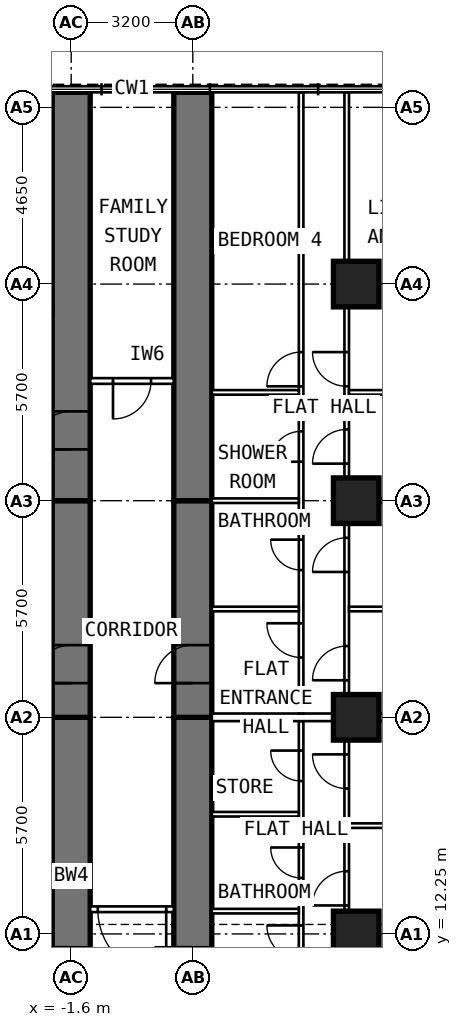
"""IFC4 building model, lengths in metres.
Left out: names, types, materials, properties, quantities, classifications, styles, units other than length and angle.
Written with IfcOpenShell. Run it as: python <this file> out.ifc"""

import sys

from ifc_helpers import new_model, si_unit, direction, frame, frame_2d, origin, origin_2d, place, context, subcontext, project, spatial, rectangle, extrude, element, fill, save


model = new_model("IFC4")
c1 = context("Model", 3, precision=1e-05, world=origin(), true_north=direction((0.0, 1.0)))
c2 = subcontext(c1, "Body", "Model", "MODEL_VIEW")
j1 = project(units=[si_unit("LENGTHUNIT", "METRE"), si_unit("PLANEANGLEUNIT", "RADIAN")], contexts=[c1])
p1 = place(None, origin())
s1 = spatial("IfcSite", under=j1, at=p1, CompositionType="ELEMENT")
p2 = place(p1, origin())
s2 = spatial("IfcBuilding", under=s1, at=p2, CompositionType="ELEMENT")
p3 = place(p2, frame((0.0, 0.0, 75.4)))
s3 = spatial("IfcBuildingStorey", under=s2, at=p3, CompositionType="ELEMENT", Elevation=75.4)
for number, where, z_axis, x_axis in (
    (1, (5.9, 12.25, 0.0), (0.0, 0.0, 1.0), (0.0, 1.0, 0.0)),
    (2, (5.9, 17.95, 0.0), (0.0, 0.0, 1.0), (0.0, 1.0, 0.0)),
    (3, (5.9, 23.65, 0.0), (0.0, 0.0, 1.0), (0.0, 1.0, 0.0)),
    (4, (5.9, 29.35, 0.0), (0.0, 0.0, 1.0), (0.0, 1.0, 0.0)),
):
    element("IfcColumn", number, at=place(p3, frame(where, z_axis=z_axis, x_axis=x_axis)), inside=s3, PredefinedType="COLUMN", context=c2, shape_type="SweptSolid", body=[
        extrude(rectangle(XDim=1.2, YDim=1.2, at=origin_2d()), origin(), (0.0, 0.0, 1.0), 5.4),
    ])
p4 = place(p3, frame((-1.6, 9.6, 0.0), z_axis=(0.0, 0.0, 1.0), x_axis=(0.0, 1.0, 0.0)))
e5 = element("IfcWall", 5, at=p4, inside=s3, PredefinedType="SHEAR", context=c2, shape_type="SweptSolid", body=[
    extrude(rectangle(XDim=8.35, YDim=1.0, at=frame_2d((4.175, 0.0))), origin(), (0.0, 0.0, 1.0), 5.4),
])
p5 = place(p4, frame((1.3, 0.0, 0.0)))
e6 = element("IfcOpeningElement", 6, at=p5, cuts=e5, PredefinedType="OPENING", context=c2, shape_type="SweptSolid", body=[
    extrude(rectangle(XDim=1.0, YDim=2.1, at=frame_2d((0.5, 1.05))), frame((0.0, 0.512, 0.0), z_axis=(0.0, -1.0, 0.0), x_axis=(1.0, 0.0, 0.0)), (0.0, 0.0, 1.0), 1.024),
])
p6 = place(p3, frame((-1.6, 17.95, 0.0), z_axis=(0.0, 0.0, 1.0), x_axis=(0.0, 1.0, 0.0)))
e7 = element("IfcWall", 7, at=p6, inside=s3, PredefinedType="SHEAR", context=c2, shape_type="SweptSolid", body=[
    extrude(rectangle(XDim=5.7, YDim=1.0, at=frame_2d((2.85, 0.0))), origin(), (0.0, 0.0, 1.0), 5.4),
])
p7 = place(p6, frame((0.9, 0.0, 0.0)))
e8 = element("IfcOpeningElement", 8, at=p7, cuts=e7, PredefinedType="OPENING", context=c2, shape_type="SweptSolid", body=[
    extrude(rectangle(XDim=1.0, YDim=2.1, at=frame_2d((0.5, 1.05))), frame((0.0, 0.512, 0.0), z_axis=(0.0, -1.0, 0.0), x_axis=(1.0, 0.0, 0.0)), (0.0, 0.0, 1.0), 1.024),
])
p8 = place(p3, frame((-1.6, 23.65, 0.0), z_axis=(0.0, 0.0, 1.0), x_axis=(0.0, 1.0, 0.0)))
e9 = element("IfcWall", 9, at=p8, inside=s3, PredefinedType="SHEAR", context=c2, shape_type="SweptSolid", body=[
    extrude(rectangle(XDim=10.745, YDim=1.0, at=frame_2d((5.373, 0.0))), origin(), (0.0, 0.0, 1.0), 5.4),
])
p9 = place(p8, frame((1.35, 0.0, 0.0)))
e10 = element("IfcOpeningElement", 10, at=p9, cuts=e9, PredefinedType="OPENING", context=c2, shape_type="SweptSolid", body=[
    extrude(rectangle(XDim=1.0, YDim=2.1, at=frame_2d((0.5, 1.05))), frame((0.0, 0.512, 0.0), z_axis=(0.0, -1.0, 0.0), x_axis=(1.0, 0.0, 0.0)), (0.0, 0.0, 1.0), 1.024),
])
p10 = place(p3, frame((1.6, 9.6, 0.0), z_axis=(0.0, 0.0, 1.0), x_axis=(0.0, 1.0, 0.0)))
e11 = element("IfcWall", 11, at=p10, inside=s3, PredefinedType="SHEAR", context=c2, shape_type="SweptSolid", body=[
    extrude(rectangle(XDim=8.35, YDim=1.0, at=frame_2d((4.175, 0.0))), origin(), (0.0, 0.0, 1.0), 5.4),
])
p11 = place(p10, frame((1.3, 0.0, 0.0)))
e12 = element("IfcOpeningElement", 12, at=p11, cuts=e11, PredefinedType="OPENING", context=c2, shape_type="SweptSolid", body=[
    extrude(rectangle(XDim=1.0, YDim=2.1, at=frame_2d((0.5, 1.05))), frame((0.0, 0.512, 0.0), z_axis=(0.0, -1.0, 0.0), x_axis=(1.0, 0.0, 0.0)), (0.0, 0.0, 1.0), 1.024),
])
p12 = place(p3, frame((1.6, 17.95, 0.0), z_axis=(0.0, 0.0, 1.0), x_axis=(0.0, 1.0, 0.0)))
e13 = element("IfcWall", 13, at=p12, inside=s3, PredefinedType="SHEAR", context=c2, shape_type="SweptSolid", body=[
    extrude(rectangle(XDim=5.7, YDim=1.0, at=frame_2d((2.85, 0.0))), origin(), (0.0, 0.0, 1.0), 5.4),
])
p13 = place(p12, frame((0.9, 0.0, 0.0)))
e14 = element("IfcOpeningElement", 14, at=p13, cuts=e13, PredefinedType="OPENING", context=c2, shape_type="SweptSolid", body=[
    extrude(rectangle(XDim=1.0, YDim=2.1, at=frame_2d((0.5, 1.05))), frame((0.0, 0.512, 0.0), z_axis=(0.0, -1.0, 0.0), x_axis=(1.0, 0.0, 0.0)), (0.0, 0.0, 1.0), 1.024),
])
p14 = place(p3, frame((1.6, 23.65, 0.0), z_axis=(0.0, 0.0, 1.0), x_axis=(0.0, 1.0, 0.0)))
e15 = element("IfcWall", 15, at=p14, inside=s3, PredefinedType="SHEAR", context=c2, shape_type="SweptSolid", body=[
    extrude(rectangle(XDim=10.745, YDim=1.0, at=frame_2d((5.373, 0.0))), origin(), (0.0, 0.0, 1.0), 5.4),
])
p15 = place(p3, frame((4.45, 10.1, 0.0), z_axis=(0.0, 0.0, 1.0), x_axis=(0.0, 1.0, 0.0)))
e16 = element("IfcWall", 16, at=p15, inside=s3, PredefinedType="PARTITIONING", context=c2, shape_type="SweptSolid", body=[
    extrude(rectangle(XDim=7.75, YDim=0.12, at=frame_2d((3.875, 0.0))), origin(), (0.0, 0.0, 1.0), 5.15),
])
p16 = place(p15, frame((1.475, 0.0, 0.0)))
e17 = element("IfcOpeningElement", 17, at=p16, cuts=e16, PredefinedType="OPENING", context=c2, shape_type="SweptSolid", body=[
    extrude(rectangle(XDim=0.9, YDim=2.1, at=frame_2d((0.45, 1.05))), frame((0.0, 0.072, 0.0), z_axis=(0.0, -1.0, 0.0), x_axis=(1.0, 0.0, 0.0)), (0.0, 0.0, 1.0), 0.144),
])
p17 = place(p15, frame((3.625, 0.0, 0.0)))
e18 = element("IfcOpeningElement", 18, at=p17, cuts=e16, PredefinedType="OPENING", context=c2, shape_type="SweptSolid", body=[
    extrude(rectangle(XDim=0.8, YDim=2.1, at=frame_2d((0.4, 1.05))), frame((0.0, 0.072, 0.0), z_axis=(0.0, -1.0, 0.0), x_axis=(1.0, 0.0, 0.0)), (0.0, 0.0, 1.0), 0.144),
])
p18 = place(p15, frame((6.175, 0.0, 0.0)))
e19 = element("IfcOpeningElement", 19, at=p18, cuts=e16, PredefinedType="OPENING", context=c2, shape_type="SweptSolid", body=[
    extrude(rectangle(XDim=0.8, YDim=2.1, at=frame_2d((0.4, 1.05))), frame((0.0, 0.072, 0.0), z_axis=(0.0, -1.0, 0.0), x_axis=(1.0, 0.0, 0.0)), (0.0, 0.0, 1.0), 0.144),
])
p19 = place(p3, frame((5.65, 9.6, 0.0), z_axis=(0.0, 0.0, 1.0), x_axis=(0.0, 1.0, 0.0)))
e20 = element("IfcWall", 20, at=p19, inside=s3, PredefinedType="PARTITIONING", context=c2, shape_type="SweptSolid", body=[
    extrude(rectangle(XDim=8.1, YDim=0.12, at=frame_2d((4.05, 0.0))), origin(), (0.0, 0.0, 1.0), 5.15),
])
p20 = place(p19, frame((3.4, 0.0, 0.0)))
e21 = element("IfcOpeningElement", 21, at=p20, cuts=e20, PredefinedType="OPENING", context=c2, shape_type="SweptSolid", body=[
    extrude(rectangle(XDim=0.9, YDim=2.1, at=frame_2d((0.45, 1.05))), frame((0.0, 0.072, 0.0), z_axis=(0.0, -1.0, 0.0), x_axis=(1.0, 0.0, 0.0)), (0.0, 0.0, 1.0), 0.144),
])
p21 = place(p19, frame((6.475, 0.0, 0.0)))
e22 = element("IfcOpeningElement", 22, at=p21, cuts=e20, PredefinedType="OPENING", context=c2, shape_type="SweptSolid", body=[
    extrude(rectangle(XDim=0.9, YDim=2.1, at=frame_2d((0.45, 1.05))), frame((0.0, 0.072, 0.0), z_axis=(0.0, -1.0, 0.0), x_axis=(1.0, 0.0, 0.0)), (0.0, 0.0, 1.0), 0.144),
])
p22 = place(p3, frame((5.71, 15.1, 0.0), z_axis=(0.0, 0.0, 1.0), x_axis=(1.0, 0.0, 0.0)))
e23 = element("IfcWall", 23, at=p22, inside=s3, PredefinedType="PARTITIONING", context=c2, shape_type="SweptSolid", body=[
    extrude(rectangle(XDim=5.035, YDim=0.12, at=frame_2d((2.518, 0.0))), origin(), (0.0, 0.0, 1.0), 5.15),
])
for number, where, z_axis, x_axis in (
    (24, (2.1, 12.85, 0.0), (0.0, 0.0, 1.0), (1.0, 0.0, 0.0)),
    (25, (2.1, 15.4, 0.0), (0.0, 0.0, 1.0), (1.0, 0.0, 0.0)),
):
    element("IfcWall", number, at=place(p3, frame(where, z_axis=z_axis, x_axis=x_axis)), inside=s3, PredefinedType="PARTITIONING", context=c2, shape_type="SweptSolid", body=[
        extrude(rectangle(XDim=2.29, YDim=0.12, at=frame_2d((1.145, 0.0))), origin(), (0.0, 0.0, 1.0), 5.15),
    ])
p23 = place(p3, frame((4.45, 18.05, 0.0), z_axis=(0.0, 0.0, 1.0), x_axis=(0.0, 1.0, 0.0)))
e26 = element("IfcWall", 26, at=p23, inside=s3, PredefinedType="PARTITIONING", context=c2, shape_type="SweptSolid", body=[
    extrude(rectangle(XDim=16.345, YDim=0.12, at=frame_2d((8.172, 0.0))), origin(), (0.0, 0.0, 1.0), 5.15),
])
p24 = place(p23, frame((1.475, 0.0, 0.0)))
e27 = element("IfcOpeningElement", 27, at=p24, cuts=e26, PredefinedType="OPENING", context=c2, shape_type="SweptSolid", body=[
    extrude(rectangle(XDim=0.9, YDim=2.1, at=frame_2d((0.45, 1.05))), frame((0.0, 0.072, 0.0), z_axis=(0.0, -1.0, 0.0), x_axis=(1.0, 0.0, 0.0)), (0.0, 0.0, 1.0), 0.144),
])
p25 = place(p23, frame((3.775, 0.0, 0.0)))
e28 = element("IfcOpeningElement", 28, at=p25, cuts=e26, PredefinedType="OPENING", context=c2, shape_type="SweptSolid", body=[
    extrude(rectangle(XDim=0.8, YDim=2.1, at=frame_2d((0.4, 1.05))), frame((0.0, 0.072, 0.0), z_axis=(0.0, -1.0, 0.0), x_axis=(1.0, 0.0, 0.0)), (0.0, 0.0, 1.0), 0.144),
])
p26 = place(p23, frame((6.625, 0.0, 0.0)))
e29 = element("IfcOpeningElement", 29, at=p26, cuts=e26, PredefinedType="OPENING", context=c2, shape_type="SweptSolid", body=[
    extrude(rectangle(XDim=0.8, YDim=2.1, at=frame_2d((0.4, 1.05))), frame((0.0, 0.072, 0.0), z_axis=(0.0, -1.0, 0.0), x_axis=(1.0, 0.0, 0.0)), (0.0, 0.0, 1.0), 0.144),
])
p27 = place(p23, frame((8.61, 0.0, 0.0)))
e30 = element("IfcOpeningElement", 30, at=p27, cuts=e26, PredefinedType="OPENING", context=c2, shape_type="SweptSolid", body=[
    extrude(rectangle(XDim=0.9, YDim=2.1, at=frame_2d((0.45, 1.05))), frame((0.0, 0.072, 0.0), z_axis=(0.0, -1.0, 0.0), x_axis=(1.0, 0.0, 0.0)), (0.0, 0.0, 1.0), 0.144),
])
p28 = place(p3, frame((5.65, 18.05, 0.0), z_axis=(0.0, 0.0, 1.0), x_axis=(0.0, 1.0, 0.0)))
e31 = element("IfcWall", 31, at=p28, inside=s3, PredefinedType="PARTITIONING", context=c2, shape_type="SweptSolid", body=[
    extrude(rectangle(XDim=16.345, YDim=0.12, at=frame_2d((8.172, 0.0))), origin(), (0.0, 0.0, 1.0), 5.15),
])
p29 = place(p28, frame((0.875, 0.0, 0.0)))
e32 = element("IfcOpeningElement", 32, at=p29, cuts=e31, PredefinedType="OPENING", context=c2, shape_type="SweptSolid", body=[
    extrude(rectangle(XDim=0.9, YDim=2.1, at=frame_2d((0.45, 1.05))), frame((0.0, 0.072, 0.0), z_axis=(0.0, -1.0, 0.0), x_axis=(1.0, 0.0, 0.0)), (0.0, 0.0, 1.0), 0.144),
])
p30 = place(p28, frame((3.725, 0.0, 0.0)))
e33 = element("IfcOpeningElement", 33, at=p30, cuts=e31, PredefinedType="OPENING", context=c2, shape_type="SweptSolid", body=[
    extrude(rectangle(XDim=0.9, YDim=2.1, at=frame_2d((0.45, 1.05))), frame((0.0, 0.072, 0.0), z_axis=(0.0, -1.0, 0.0), x_axis=(1.0, 0.0, 0.0)), (0.0, 0.0, 1.0), 0.144),
])
p31 = place(p28, frame((6.575, 0.0, 0.0)))
e34 = element("IfcOpeningElement", 34, at=p31, cuts=e31, PredefinedType="OPENING", context=c2, shape_type="SweptSolid", body=[
    extrude(rectangle(XDim=0.9, YDim=2.1, at=frame_2d((0.45, 1.05))), frame((0.0, 0.072, 0.0), z_axis=(0.0, -1.0, 0.0), x_axis=(1.0, 0.0, 0.0)), (0.0, 0.0, 1.0), 0.144),
])
p32 = place(p28, frame((8.61, 0.0, 0.0)))
e35 = element("IfcOpeningElement", 35, at=p32, cuts=e31, PredefinedType="OPENING", context=c2, shape_type="SweptSolid", body=[
    extrude(rectangle(XDim=0.9, YDim=2.1, at=frame_2d((0.45, 1.05))), frame((0.0, 0.072, 0.0), z_axis=(0.0, -1.0, 0.0), x_axis=(1.0, 0.0, 0.0)), (0.0, 0.0, 1.0), 0.144),
])
p33 = place(p3, frame((5.71, 20.8, 0.0), z_axis=(0.0, 0.0, 1.0), x_axis=(1.0, 0.0, 0.0)))
e36 = element("IfcWall", 36, at=p33, inside=s3, PredefinedType="PARTITIONING", context=c2, shape_type="SweptSolid", body=[
    extrude(rectangle(XDim=5.035, YDim=0.12, at=frame_2d((2.518, 0.0))), origin(), (0.0, 0.0, 1.0), 5.15),
])
p34 = place(p3, frame((5.71, 23.65, 0.0), z_axis=(0.0, 0.0, 1.0), x_axis=(1.0, 0.0, 0.0)))
e37 = element("IfcWall", 37, at=p34, inside=s3, PredefinedType="PARTITIONING", context=c2, shape_type="SweptSolid", body=[
    extrude(rectangle(XDim=5.035, YDim=0.12, at=frame_2d((2.518, 0.0))), origin(), (0.0, 0.0, 1.0), 4.25),
])
p35 = place(p3, frame((5.71, 26.5, 0.0), z_axis=(0.0, 0.0, 1.0), x_axis=(1.0, 0.0, 0.0)))
e38 = element("IfcWall", 38, at=p35, inside=s3, PredefinedType="PARTITIONING", context=c2, shape_type="SweptSolid", body=[
    extrude(rectangle(XDim=5.035, YDim=0.12, at=frame_2d((2.518, 0.0))), origin(), (0.0, 0.0, 1.0), 5.15),
])
p36 = place(p3, frame((2.1, 20.8, 0.0), z_axis=(0.0, 0.0, 1.0), x_axis=(1.0, 0.0, 0.0)))
e39 = element("IfcWall", 39, at=p36, inside=s3, PredefinedType="PARTITIONING", context=c2, shape_type="SweptSolid", body=[
    extrude(rectangle(XDim=2.29, YDim=0.12, at=frame_2d((1.145, 0.0))), origin(), (0.0, 0.0, 1.0), 5.15),
])
p37 = place(p3, frame((2.1, 23.65, 0.0), z_axis=(0.0, 0.0, 1.0), x_axis=(1.0, 0.0, 0.0)))
e40 = element("IfcWall", 40, at=p37, inside=s3, PredefinedType="PARTITIONING", context=c2, shape_type="SweptSolid", body=[
    extrude(rectangle(XDim=2.29, YDim=0.12, at=frame_2d((1.145, 0.0))), origin(), (0.0, 0.0, 1.0), 4.25),
])
p38 = place(p3, frame((2.1, 26.5, 0.0), z_axis=(0.0, 0.0, 1.0), x_axis=(1.0, 0.0, 0.0)))
e41 = element("IfcWall", 41, at=p38, inside=s3, PredefinedType="PARTITIONING", context=c2, shape_type="SweptSolid", body=[
    extrude(rectangle(XDim=2.29, YDim=0.12, at=frame_2d((1.145, 0.0))), origin(), (0.0, 0.0, 1.0), 5.15),
])
p39 = place(p3, frame((2.1, 17.95, 0.0), z_axis=(0.0, 0.0, 1.0), x_axis=(1.0, 0.0, 0.0)))
e42 = element("IfcWall", 42, at=p39, inside=s3, PredefinedType="PARTITIONING", context=c2, shape_type="SweptSolid", body=[
    extrude(rectangle(XDim=8.645, YDim=0.2, at=frame_2d((4.323, 0.0))), origin(), (0.0, 0.0, 1.0), 4.25),
])
p40 = place(p3, frame((1.1, 26.8, 0.0), z_axis=(0.0, 0.0, 1.0), x_axis=(-1.0, 0.0, 0.0)))
e43 = element("IfcWall", 43, at=p40, inside=s3, PredefinedType="PARTITIONING", context=c2, shape_type="SweptSolid", body=[
    extrude(rectangle(XDim=2.2, YDim=0.15, at=frame_2d((1.1, 0.0))), origin(), (0.0, 0.0, 1.0), 5.15),
])
p41 = place(p40, frame((0.6, 0.0, 0.0)))
e44 = element("IfcOpeningElement", 44, at=p41, cuts=e43, PredefinedType="OPENING", context=c2, shape_type="SweptSolid", body=[
    extrude(rectangle(XDim=1.0, YDim=2.1, at=frame_2d((0.5, 1.05))), frame((0.0, 0.087, 0.0), z_axis=(0.0, -1.0, 0.0), x_axis=(1.0, 0.0, 0.0)), (0.0, 0.0, 1.0), 0.174),
])
p42 = place(p3, frame((1.1, 12.9, 0.0), z_axis=(0.0, 0.0, 1.0), x_axis=(-1.0, 0.0, 0.0)))
e45 = element("IfcWall", 45, at=p42, inside=s3, PredefinedType="PARTITIONING", context=c2, shape_type="SweptSolid", body=[
    extrude(rectangle(XDim=2.2, YDim=0.15, at=frame_2d((1.1, 0.0))), origin(), (0.0, 0.0, 1.0), 5.15),
])
p43 = place(p42, frame((0.2, 0.0, 0.0)))
e46 = element("IfcOpeningElement", 46, at=p43, cuts=e45, PredefinedType="OPENING", context=c2, shape_type="SweptSolid", body=[
    extrude(rectangle(XDim=1.8, YDim=2.1, at=frame_2d((0.9, 1.05))), frame((0.0, 0.087, 0.0), z_axis=(0.0, -1.0, 0.0), x_axis=(1.0, 0.0, 0.0)), (0.0, 0.0, 1.0), 0.174),
])
p44 = place(p7, origin())
e47 = element("IfcDoor", 47, at=p44, inside=s3, OperationType="SINGLE_SWING_LEFT", PredefinedType="DOOR", context=c2, shape_type="SweptSolid", body=[
    extrude(rectangle(XDim=1.0, YDim=2.1, at=frame_2d((0.5, 1.05))), frame((0.0, 0.25, 0.0), z_axis=(0.0, -1.0, 0.0), x_axis=(1.0, 0.0, 0.0)), (0.0, 0.0, 1.0), 0.5),
])
fill(e8, e47)
p45 = place(p20, origin())
e48 = element("IfcDoor", 48, at=p45, inside=s3, OperationType="SINGLE_SWING_LEFT", PredefinedType="DOOR", context=c2, shape_type="SweptSolid", body=[
    extrude(rectangle(XDim=0.9, YDim=2.1, at=frame_2d((0.45, 1.05))), frame((0.0, 0.025, 0.0), z_axis=(0.0, -1.0, 0.0), x_axis=(1.0, 0.0, 0.0)), (0.0, 0.0, 1.0), 0.05),
])
fill(e21, e48)
p46 = place(p21, origin())
e49 = element("IfcDoor", 49, at=p46, inside=s3, OperationType="SINGLE_SWING_RIGHT", PredefinedType="DOOR", context=c2, shape_type="SweptSolid", body=[
    extrude(rectangle(XDim=0.9, YDim=2.1, at=frame_2d((0.45, 1.05))), frame((0.0, 0.025, 0.0), z_axis=(0.0, -1.0, 0.0), x_axis=(1.0, 0.0, 0.0)), (0.0, 0.0, 1.0), 0.05),
])
fill(e22, e49)
p47 = place(p16, origin())
e50 = element("IfcDoor", 50, at=p47, inside=s3, OperationType="SINGLE_SWING_RIGHT", PredefinedType="DOOR", context=c2, shape_type="SweptSolid", body=[
    extrude(rectangle(XDim=0.9, YDim=2.1, at=frame_2d((0.45, 1.05))), frame((0.0, 0.025, 0.0), z_axis=(0.0, -1.0, 0.0), x_axis=(1.0, 0.0, 0.0)), (0.0, 0.0, 1.0), 0.05),
])
fill(e17, e50)
p48 = place(p17, origin())
e51 = element("IfcDoor", 51, at=p48, inside=s3, OperationType="SINGLE_SWING_RIGHT", PredefinedType="DOOR", context=c2, shape_type="SweptSolid", body=[
    extrude(rectangle(XDim=0.8, YDim=2.1, at=frame_2d((0.4, 1.05))), frame((0.0, 0.025, 0.0), z_axis=(0.0, -1.0, 0.0), x_axis=(1.0, 0.0, 0.0)), (0.0, 0.0, 1.0), 0.05),
])
fill(e18, e51)
p49 = place(p18, origin())
e52 = element("IfcDoor", 52, at=p49, inside=s3, OperationType="SINGLE_SWING_RIGHT", PredefinedType="DOOR", context=c2, shape_type="SweptSolid", body=[
    extrude(rectangle(XDim=0.8, YDim=2.1, at=frame_2d((0.4, 1.05))), frame((0.0, 0.025, 0.0), z_axis=(0.0, -1.0, 0.0), x_axis=(1.0, 0.0, 0.0)), (0.0, 0.0, 1.0), 0.05),
])
fill(e19, e52)
p50 = place(p13, origin())
e53 = element("IfcDoor", 53, at=p50, inside=s3, OperationType="SINGLE_SWING_LEFT", PredefinedType="DOOR", context=c2, shape_type="SweptSolid", body=[
    extrude(rectangle(XDim=1.0, YDim=2.1, at=frame_2d((0.5, 1.05))), frame((0.0, 0.25, 0.0), z_axis=(0.0, -1.0, 0.0), x_axis=(1.0, 0.0, 0.0)), (0.0, 0.0, 1.0), 0.5),
])
fill(e14, e53)
p51 = place(p29, origin())
e54 = element("IfcDoor", 54, at=p51, inside=s3, OperationType="SINGLE_SWING_LEFT", PredefinedType="DOOR", context=c2, shape_type="SweptSolid", body=[
    extrude(rectangle(XDim=0.9, YDim=2.1, at=frame_2d((0.45, 1.05))), frame((0.0, 0.025, 0.0), z_axis=(0.0, -1.0, 0.0), x_axis=(1.0, 0.0, 0.0)), (0.0, 0.0, 1.0), 0.05),
])
fill(e32, e54)
p52 = place(p30, origin())
e55 = element("IfcDoor", 55, at=p52, inside=s3, OperationType="SINGLE_SWING_LEFT", PredefinedType="DOOR", context=c2, shape_type="SweptSolid", body=[
    extrude(rectangle(XDim=0.9, YDim=2.1, at=frame_2d((0.45, 1.05))), frame((0.0, 0.025, 0.0), z_axis=(0.0, -1.0, 0.0), x_axis=(1.0, 0.0, 0.0)), (0.0, 0.0, 1.0), 0.05),
])
fill(e33, e55)
p53 = place(p31, origin())
e56 = element("IfcDoor", 56, at=p53, inside=s3, OperationType="SINGLE_SWING_LEFT", PredefinedType="DOOR", context=c2, shape_type="SweptSolid", body=[
    extrude(rectangle(XDim=0.9, YDim=2.1, at=frame_2d((0.45, 1.05))), frame((0.0, 0.025, 0.0), z_axis=(0.0, -1.0, 0.0), x_axis=(1.0, 0.0, 0.0)), (0.0, 0.0, 1.0), 0.05),
])
fill(e34, e56)
p54 = place(p32, origin())
e57 = element("IfcDoor", 57, at=p54, inside=s3, OperationType="SINGLE_SWING_RIGHT", PredefinedType="DOOR", context=c2, shape_type="SweptSolid", body=[
    extrude(rectangle(XDim=0.9, YDim=2.1, at=frame_2d((0.45, 1.05))), frame((0.0, 0.025, 0.0), z_axis=(0.0, -1.0, 0.0), x_axis=(1.0, 0.0, 0.0)), (0.0, 0.0, 1.0), 0.05),
])
fill(e35, e57)
p55 = place(p24, origin())
e58 = element("IfcDoor", 58, at=p55, inside=s3, OperationType="SINGLE_SWING_RIGHT", PredefinedType="DOOR", context=c2, shape_type="SweptSolid", body=[
    extrude(rectangle(XDim=0.9, YDim=2.1, at=frame_2d((0.45, 1.05))), frame((0.0, 0.025, 0.0), z_axis=(0.0, -1.0, 0.0), x_axis=(1.0, 0.0, 0.0)), (0.0, 0.0, 1.0), 0.05),
])
fill(e27, e58)
p56 = place(p25, origin())
e59 = element("IfcDoor", 59, at=p56, inside=s3, OperationType="SINGLE_SWING_RIGHT", PredefinedType="DOOR", context=c2, shape_type="SweptSolid", body=[
    extrude(rectangle(XDim=0.8, YDim=2.1, at=frame_2d((0.4, 1.05))), frame((0.0, 0.025, 0.0), z_axis=(0.0, -1.0, 0.0), x_axis=(1.0, 0.0, 0.0)), (0.0, 0.0, 1.0), 0.05),
])
fill(e28, e59)
p57 = place(p26, origin())
e60 = element("IfcDoor", 60, at=p57, inside=s3, OperationType="SINGLE_SWING_LEFT", PredefinedType="DOOR", context=c2, shape_type="SweptSolid", body=[
    extrude(rectangle(XDim=0.8, YDim=2.1, at=frame_2d((0.4, 1.05))), frame((0.0, 0.025, 0.0), z_axis=(0.0, -1.0, 0.0), x_axis=(1.0, 0.0, 0.0)), (0.0, 0.0, 1.0), 0.05),
])
fill(e29, e60)
p58 = place(p27, origin())
e61 = element("IfcDoor", 61, at=p58, inside=s3, OperationType="SINGLE_SWING_LEFT", PredefinedType="DOOR", context=c2, shape_type="SweptSolid", body=[
    extrude(rectangle(XDim=0.9, YDim=2.1, at=frame_2d((0.45, 1.05))), frame((0.0, 0.025, 0.0), z_axis=(0.0, -1.0, 0.0), x_axis=(1.0, 0.0, 0.0)), (0.0, 0.0, 1.0), 0.05),
])
fill(e30, e61)
p59 = place(p41, origin())
e62 = element("IfcDoor", 62, at=p59, inside=s3, OperationType="SINGLE_SWING_RIGHT", PredefinedType="DOOR", context=c2, shape_type="SweptSolid", body=[
    extrude(rectangle(XDim=1.0, YDim=2.1, at=frame_2d((0.5, 1.05))), frame((0.0, 0.025, 0.0), z_axis=(0.0, -1.0, 0.0), x_axis=(1.0, 0.0, 0.0)), (0.0, 0.0, 1.0), 0.05),
])
fill(e44, e62)
p60 = place(p43, origin())
e63 = element("IfcDoor", 63, at=p60, inside=s3, OperationType="DOUBLE_DOOR_DOUBLE_SWING", PredefinedType="DOOR", context=c2, shape_type="SweptSolid", body=[
    extrude(rectangle(XDim=1.8, YDim=2.1, at=frame_2d((0.9, 1.05))), frame((0.0, 0.025, 0.0), z_axis=(0.0, -1.0, 0.0), x_axis=(1.0, 0.0, 0.0)), (0.0, 0.0, 1.0), 0.05),
])
fill(e46, e63)
p61 = place(p9, origin())
e64 = element("IfcDoor", 64, at=p61, inside=s3, OperationType="SINGLE_SWING_LEFT", PredefinedType="DOOR", context=c2, shape_type="SweptSolid", body=[
    extrude(rectangle(XDim=1.0, YDim=2.1, at=frame_2d((0.5, 1.05))), frame((0.0, 0.25, 0.0), z_axis=(0.0, -1.0, 0.0), x_axis=(1.0, 0.0, 0.0)), (0.0, 0.0, 1.0), 0.5),
])
fill(e10, e64)
save(model, sys.argv[1])
